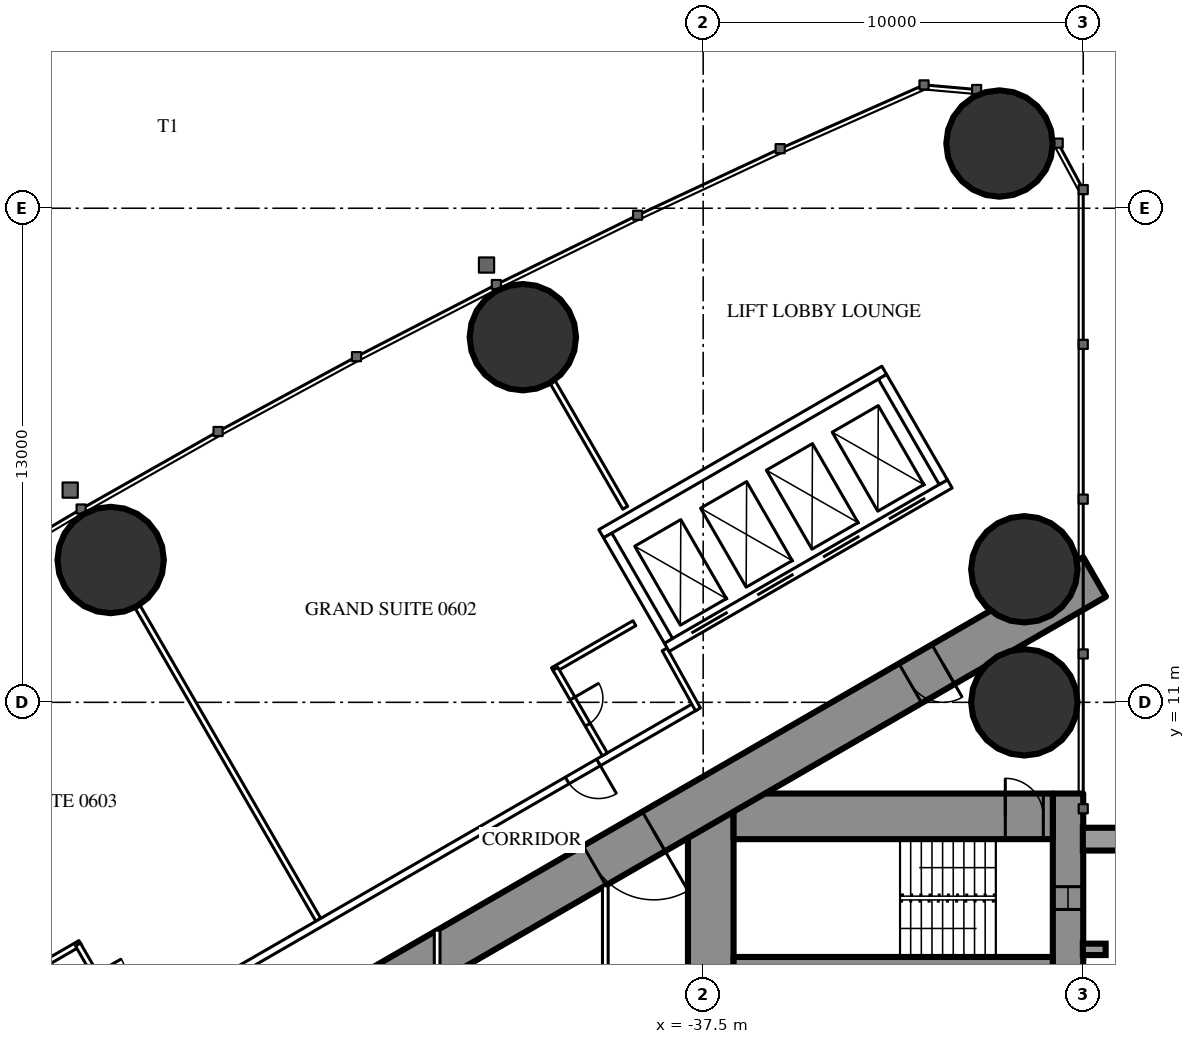
"""IFC4 building model, lengths in metres.
Left out: names, types, materials, properties, quantities, classifications, styles, units other than length and angle.
Written with IfcOpenShell. Run it as: python <this file> out.ifc"""

import sys

from ifc_helpers import new_model, si_unit, direction, frame, frame_2d, origin, origin_2d, place, context, subcontext, project, spatial, rectangle, hollow_circle, extrude, element, fill, save


model = new_model("IFC4")
c1 = context("Model", 3, precision=1e-05, world=origin(), true_north=direction((0.0, 1.0)))
c2 = subcontext(c1, "Body", "Model", "MODEL_VIEW")
j1 = project(units=[si_unit("LENGTHUNIT", "METRE"), si_unit("PLANEANGLEUNIT", "RADIAN")], contexts=[c1])
p1 = place(None, origin())
s1 = spatial("IfcSite", under=j1, at=p1, CompositionType="ELEMENT")
p2 = place(p1, origin())
s2 = spatial("IfcBuilding", under=s1, at=p2, CompositionType="ELEMENT")
p3 = place(p2, frame((0.0, 0.0, 28.5)))
s3 = spatial("IfcBuildingStorey", under=s2, at=p3, CompositionType="ELEMENT", Elevation=28.5)
for number, where, z_axis, x_axis in (
    (1, (-29.703, 25.703, 0.0), (0.0, 0.0, 1.0), (1.0, 0.0, 0.0)),
    (2, (-29.05, 11.0, 0.0), (0.0, 0.0, 1.0), (1.0, 0.0, 0.0)),
    (3, (-29.05, 14.5, 0.0), (0.0, 0.0, 1.0), (1.0, 0.0, 0.0)),
    (4, (-42.245, 20.607, 0.0), (0.0, 0.0, 1.0), (1.0, 0.0, 0.0)),
    (5, (-53.09, 14.745, 0.0), (0.0, 0.0, 1.0), (1.0, 0.0, 0.0)),
):
    element("IfcColumn", number, at=place(p3, frame(where, z_axis=z_axis, x_axis=x_axis)), inside=s3, PredefinedType="COLUMN", context=c2, shape_type="SweptSolid", body=[
        extrude(hollow_circle(Radius=1.4, WallThickness=0.12, at=origin_2d()), origin(), (0.0, 0.0, 1.0), 3.5),
    ])
p4 = place(p3, frame((-27.9, 8.6, 0.0), z_axis=(0.0, 0.0, 1.0), x_axis=(0.0, -1.0, 0.0)))
e6 = element("IfcWall", 6, at=p4, inside=s3, PredefinedType="SHEAR", context=c2, shape_type="SweptSolid", body=[
    extrude(rectangle(XDim=17.2, YDim=0.8, at=frame_2d((8.6, 0.0))), origin(), (0.0, 0.0, 1.0), 3.5),
])
p5 = place(p4, frame((2.45, 0.0, 0.6)))
e7 = element("IfcOpeningElement", 7, at=p5, cuts=e6, PredefinedType="OPENING", context=c2, shape_type="SweptSolid", body=[
    extrude(rectangle(XDim=0.6, YDim=2.1, at=frame_2d((0.3, 1.05))), frame((0.0, 0.41, 0.0), z_axis=(0.0, -1.0, 0.0), x_axis=(1.0, 0.0, 0.0)), (0.0, 0.0, 1.0), 0.82),
])
p6 = place(p4, frame((14.15, 0.0, 0.6)))
e8 = element("IfcOpeningElement", 8, at=p6, cuts=e6, PredefinedType="OPENING", context=c2, shape_type="SweptSolid", body=[
    extrude(rectangle(XDim=0.6, YDim=2.1, at=frame_2d((0.3, 1.05))), frame((0.0, 0.41, 0.0), z_axis=(0.0, -1.0, 0.0), x_axis=(1.0, 0.0, 0.0)), (0.0, 0.0, 1.0), 0.82),
])
p7 = place(p3, frame((-37.3, 8.6, 0.0), z_axis=(0.0, 0.0, 1.0), x_axis=(0.0, -1.0, 0.0)))
e9 = element("IfcWall", 9, at=p7, inside=s3, PredefinedType="SHEAR", context=c2, shape_type="SweptSolid", body=[
    extrude(rectangle(XDim=17.2, YDim=1.2, at=frame_2d((8.6, 0.0))), origin(), (0.0, 0.0, 1.0), 3.5),
])
p8 = place(p7, frame((7.7, 0.0, 0.0)))
e10 = element("IfcOpeningElement", 10, at=p8, cuts=e9, PredefinedType="OPENING", context=c2, shape_type="SweptSolid", body=[
    extrude(rectangle(XDim=1.8, YDim=2.2, at=frame_2d((0.9, 1.1))), frame((0.0, 0.61, 0.0), z_axis=(0.0, -1.0, 0.0), x_axis=(1.0, 0.0, 0.0)), (0.0, 0.0, 1.0), 1.22),
])
p9 = place(p3, frame((-28.3, 8.0, 0.0), z_axis=(0.0, 0.0, 1.0), x_axis=(-1.0, 0.0, 0.0)))
e11 = element("IfcWall", 11, at=p9, inside=s3, PredefinedType="SHEAR", context=c2, shape_type="SweptSolid", body=[
    extrude(rectangle(XDim=8.4, YDim=1.2, at=frame_2d((4.2, 0.0))), origin(), (0.0, 0.0, 1.0), 3.5),
])
p10 = place(p9, frame((0.25, 0.0, 0.0)))
e12 = element("IfcOpeningElement", 12, at=p10, cuts=e11, PredefinedType="OPENING", context=c2, shape_type="SweptSolid", body=[
    extrude(rectangle(XDim=1.0, YDim=2.2, at=frame_2d((0.5, 1.1))), frame((0.0, 0.61, 0.0), z_axis=(0.0, -1.0, 0.0), x_axis=(1.0, 0.0, 0.0)), (0.0, 0.0, 1.0), 1.22),
])
p11 = place(p3, frame((-28.3, 4.15, 0.0), z_axis=(0.0, 0.0, 1.0), x_axis=(-1.0, 0.0, 0.0)))
e13 = element("IfcWall", 13, at=p11, inside=s3, PredefinedType="SHEAR", context=c2, shape_type="SweptSolid", body=[
    extrude(rectangle(XDim=8.4, YDim=0.3, at=frame_2d((4.2, 0.0))), origin(), (0.0, 0.0, 1.0), 3.5),
])
p12 = place(p3, frame((-27.2, 14.3, 0.0), z_axis=(0.0, 0.0, 1.0), x_axis=(-0.866026593062, -0.499997940104, 0.0)))
e14 = element("IfcWall", 14, at=p12, inside=s3, PredefinedType="SHEAR", context=c2, shape_type="SweptSolid", body=[
    extrude(rectangle(XDim=28.946, YDim=1.2, at=frame_2d((14.473, 0.0))), origin(), (0.0, 0.0, 1.0), 3.5),
])
p13 = place(p12, frame((4.6, 0.0, 0.0)))
e15 = element("IfcOpeningElement", 15, at=p13, cuts=e14, PredefinedType="OPENING", context=c2, shape_type="SweptSolid", body=[
    extrude(rectangle(XDim=1.0, YDim=2.2, at=frame_2d((0.5, 1.1))), frame((0.0, 0.61, 0.0), z_axis=(0.0, -1.0, 0.0), x_axis=(1.0, 0.0, 0.0)), (0.0, 0.0, 1.0), 1.22),
])
p14 = place(p12, frame((13.395, 0.0, 0.0)))
e16 = element("IfcOpeningElement", 16, at=p14, cuts=e14, PredefinedType="OPENING", context=c2, shape_type="SweptSolid", body=[
    extrude(rectangle(XDim=1.8, YDim=2.2, at=frame_2d((0.9, 1.1))), frame((0.0, 0.61, 0.0), z_axis=(0.0, -1.0, 0.0), x_axis=(1.0, 0.0, 0.0)), (0.0, 0.0, 1.0), 1.22),
])
p15 = place(p3, frame((-47.627, 5.278, 0.0), z_axis=(0.0, 0.0, 1.0), x_axis=(-0.500009844318, 0.86601972009, 0.0)))
e17 = element("IfcWall", 17, at=p15, inside=s3, PredefinedType="PARTITIONING", context=c2, shape_type="SweptSolid", body=[
    extrude(rectangle(XDim=9.51, YDim=0.15, at=frame_2d((4.755, 0.0))), origin(), (0.0, 0.0, 1.0), 2.25),
])
p16 = place(p3, frame((-39.551, 16.119, 0.0), z_axis=(0.0, 0.0, 1.0), x_axis=(-0.500014214979, 0.866017196607, 0.0)))
e18 = element("IfcWall", 18, at=p16, inside=s3, PredefinedType="PARTITIONING", context=c2, shape_type="SweptSolid", body=[
    extrude(rectangle(XDim=3.815, YDim=0.15, at=frame_2d((1.907, 0.0))), origin(), (0.0, 0.0, 1.0), 3.25),
])
p17 = place(p3, frame((-37.7, 10.894, 0.0), z_axis=(0.0, 0.0, 1.0), x_axis=(-0.866027905338, -0.499995667157, 0.0)))
e19 = element("IfcWall", 19, at=p17, inside=s3, PredefinedType="PARTITIONING", context=c2, shape_type="SweptSolid", body=[
    extrude(rectangle(XDim=21.787, YDim=0.2, at=frame_2d((10.894, 0.0))), origin(), (0.0, 0.0, 1.0), 3.25),
])
p18 = place(p17, frame((16.008, 0.0, 0.0)))
e20 = element("IfcOpeningElement", 20, at=p18, cuts=e19, PredefinedType="OPENING", context=c2, shape_type="SweptSolid", body=[
    extrude(rectangle(XDim=0.95, YDim=2.2, at=frame_2d((0.475, 1.1))), frame((0.0, 0.11, 0.0), z_axis=(0.0, -1.0, 0.0), x_axis=(1.0, 0.0, 0.0)), (0.0, 0.0, 1.0), 0.22),
])
p19 = place(p17, frame((20.058, 0.0, 0.0)))
e21 = element("IfcOpeningElement", 21, at=p19, cuts=e19, PredefinedType="OPENING", context=c2, shape_type="SweptSolid", body=[
    extrude(rectangle(XDim=0.95, YDim=2.2, at=frame_2d((0.475, 1.1))), frame((0.0, 0.11, 0.0), z_axis=(0.0, -1.0, 0.0), x_axis=(1.0, 0.0, 0.0)), (0.0, 0.0, 1.0), 0.22),
])
p20 = place(p17, frame((2.95, 0.0, 0.0)))
e22 = element("IfcOpeningElement", 22, at=p20, cuts=e19, PredefinedType="OPENING", context=c2, shape_type="SweptSolid", body=[
    extrude(rectangle(XDim=0.95, YDim=2.2, at=frame_2d((0.475, 1.1))), frame((0.0, 0.11, 0.0), z_axis=(0.0, -1.0, 0.0), x_axis=(1.0, 0.0, 0.0)), (0.0, 0.0, 1.0), 0.22),
])
p21 = place(p3, frame((-38.513, 12.392, 0.0), z_axis=(0.0, 0.0, 1.0), x_axis=(0.485585508183, -0.874189175317, 0.0)))
e23 = element("IfcWall", 23, at=p21, inside=s3, PredefinedType="PARTITIONING", context=c2, shape_type="SweptSolid", body=[
    extrude(rectangle(XDim=1.805, YDim=0.15, at=frame_2d((0.902, 0.0))), origin(), (0.0, 0.0, 1.0), 3.25),
])
p22 = place(p3, frame((-53.888, 4.665, 0.0), z_axis=(0.0, 0.0, 1.0), x_axis=(-0.866006523861, -0.500032699561, 0.0)))
e24 = element("IfcWall", 24, at=p22, inside=s3, PredefinedType="PARTITIONING", context=c2, shape_type="SweptSolid", body=[
    extrude(rectangle(XDim=2.475, YDim=0.15, at=frame_2d((1.237, 0.0))), origin(), (0.0, 0.0, 1.0), 3.25),
])
p23 = place(p3, frame((-52.653, 2.376, 0.0), z_axis=(0.0, 0.0, 1.0), x_axis=(-0.500006934395, 0.866021400173, 0.0)))
e25 = element("IfcWall", 25, at=p23, inside=s3, PredefinedType="PARTITIONING", context=c2, shape_type="SweptSolid", body=[
    extrude(rectangle(XDim=2.6, YDim=0.15, at=frame_2d((1.3, 0.0))), origin(), (0.0, 0.0, 1.0), 3.25),
])
p24 = place(p23, frame((0.9, 0.0, 0.0)))
e26 = element("IfcOpeningElement", 26, at=p24, cuts=e25, PredefinedType="OPENING", context=c2, shape_type="SweptSolid", body=[
    extrude(rectangle(XDim=0.8, YDim=2.2, at=frame_2d((0.4, 1.1))), frame((0.0, 0.085, 0.0), z_axis=(0.0, -1.0, 0.0), x_axis=(1.0, 0.0, 0.0)), (0.0, 0.0, 1.0), 0.17),
])
p25 = place(p3, frame((-39.31, 13.082, 0.0), z_axis=(0.0, 0.0, 1.0), x_axis=(-0.866031185235, -0.4999899861, 0.0)))
e27 = element("IfcWall", 27, at=p25, inside=s3, PredefinedType="PARTITIONING", context=c2, shape_type="SweptSolid", body=[
    extrude(rectangle(XDim=2.475, YDim=0.15, at=frame_2d((1.238, 0.0))), origin(), (0.0, 0.0, 1.0), 3.25),
])
p26 = place(p3, frame((-40.088, 9.63, 0.0), z_axis=(0.0, 0.0, 1.0), x_axis=(-0.500006934395, 0.866021400173, 0.0)))
e28 = element("IfcWall", 28, at=p26, inside=s3, PredefinedType="PARTITIONING", context=c2, shape_type="SweptSolid", body=[
    extrude(rectangle(XDim=2.6, YDim=0.15, at=frame_2d((1.3, 0.0))), origin(), (0.0, 0.0, 1.0), 3.25),
])
p27 = place(p26, frame((0.9, 0.0, 0.0)))
e29 = element("IfcOpeningElement", 29, at=p27, cuts=e28, PredefinedType="OPENING", context=c2, shape_type="SweptSolid", body=[
    extrude(rectangle(XDim=0.8, YDim=2.2, at=frame_2d((0.4, 1.1))), frame((0.0, 0.085, 0.0), z_axis=(0.0, -1.0, 0.0), x_axis=(1.0, 0.0, 0.0)), (0.0, 0.0, 1.0), 0.17),
])
p28 = place(p3, frame((-40.075, 6.174, 0.0), z_axis=(0.0, 0.0, 1.0), x_axis=(0.0, -1.0, 0.0)))
e30 = element("IfcWall", 30, at=p28, inside=s3, PredefinedType="PARTITIONING", context=c2, shape_type="SweptSolid", body=[
    extrude(rectangle(XDim=7.374, YDim=0.15, at=frame_2d((3.687, 0.0))), origin(), (0.0, 0.0, 1.0), 3.25),
])
p29 = place(p28, frame((2.787, 0.0, 0.0)))
e31 = element("IfcOpeningElement", 31, at=p29, cuts=e30, PredefinedType="OPENING", context=c2, shape_type="SweptSolid", body=[
    extrude(rectangle(XDim=1.8, YDim=2.2, at=frame_2d((0.9, 1.1))), frame((0.0, 0.085, 0.0), z_axis=(0.0, -1.0, 0.0), x_axis=(1.0, 0.0, 0.0)), (0.0, 0.0, 1.0), 0.17),
])
p30 = place(p3, frame((-44.5, 5.005, 0.0), z_axis=(0.0, 0.0, 1.0), x_axis=(0.0, -1.0, 0.0)))
e32 = element("IfcWall", 32, at=p30, inside=s3, PredefinedType="PARTITIONING", context=c2, shape_type="SweptSolid", body=[
    extrude(rectangle(XDim=10.009, YDim=0.15, at=frame_2d((5.005, 0.0))), origin(), (0.0, 0.0, 1.0), 2.45),
])
p31 = place(p30, frame((2.002, 0.0, 0.0)))
e33 = element("IfcOpeningElement", 33, at=p31, cuts=e32, PredefinedType="OPENING", context=c2, shape_type="SweptSolid", body=[
    extrude(rectangle(XDim=1.0, YDim=2.2, at=frame_2d((0.5, 1.1))), frame((0.0, 0.085, 0.0), z_axis=(0.0, -1.0, 0.0), x_axis=(1.0, 0.0, 0.0)), (0.0, 0.0, 1.0), 0.17),
])
p32 = place(p30, frame((7.007, 0.0, 0.0)))
e34 = element("IfcOpeningElement", 34, at=p32, cuts=e32, PredefinedType="OPENING", context=c2, shape_type="SweptSolid", body=[
    extrude(rectangle(XDim=1.0, YDim=2.2, at=frame_2d((0.5, 1.1))), frame((0.0, 0.085, 0.0), z_axis=(0.0, -1.0, 0.0), x_axis=(1.0, 0.0, 0.0)), (0.0, 0.0, 1.0), 0.17),
])
p33 = place(p3, frame((-31.01, 16.747, 0.0), z_axis=(0.0, 0.0, 1.0), x_axis=(-0.866028165386, -0.499995216735, 0.0)))
e35 = element("IfcWall", 35, at=p33, inside=s3, PredefinedType="PARTITIONING", context=c2, shape_type="SweptSolid", body=[
    extrude(rectangle(XDim=8.6, YDim=0.25, at=frame_2d((4.3, 0.0))), origin(), (0.0, 0.0, 1.0), 3.25),
])
p34 = place(p33, frame((0.75, 0.0, 0.0)))
e36 = element("IfcOpeningElement", 36, at=p34, cuts=e35, PredefinedType="OPENING", context=c2, shape_type="SweptSolid", body=[
    extrude(rectangle(XDim=1.1, YDim=2.2, at=frame_2d((0.55, 1.1))), frame((0.0, 0.135, 0.0), z_axis=(0.0, -1.0, 0.0), x_axis=(1.0, 0.0, 0.0)), (0.0, 0.0, 1.0), 0.27),
])
p35 = place(p33, frame((2.75, 0.0, 0.0)))
e37 = element("IfcOpeningElement", 37, at=p35, cuts=e35, PredefinedType="OPENING", context=c2, shape_type="SweptSolid", body=[
    extrude(rectangle(XDim=1.1, YDim=2.2, at=frame_2d((0.55, 1.1))), frame((0.0, 0.135, 0.0), z_axis=(0.0, -1.0, 0.0), x_axis=(1.0, 0.0, 0.0)), (0.0, 0.0, 1.0), 0.27),
])
p36 = place(p33, frame((4.75, 0.0, 0.0)))
e38 = element("IfcOpeningElement", 38, at=p36, cuts=e35, PredefinedType="OPENING", context=c2, shape_type="SweptSolid", body=[
    extrude(rectangle(XDim=1.1, YDim=2.2, at=frame_2d((0.55, 1.1))), frame((0.0, 0.135, 0.0), z_axis=(0.0, -1.0, 0.0), x_axis=(1.0, 0.0, 0.0)), (0.0, 0.0, 1.0), 0.27),
])
p37 = place(p33, frame((6.75, 0.0, 0.0)))
e39 = element("IfcOpeningElement", 39, at=p37, cuts=e35, PredefinedType="OPENING", context=c2, shape_type="SweptSolid", body=[
    extrude(rectangle(XDim=1.1, YDim=2.2, at=frame_2d((0.55, 1.1))), frame((0.0, 0.135, 0.0), z_axis=(0.0, -1.0, 0.0), x_axis=(1.0, 0.0, 0.0)), (0.0, 0.0, 1.0), 0.27),
])
p38 = place(p3, frame((-32.736, 19.736, 0.0), z_axis=(0.0, 0.0, 1.0), x_axis=(-0.866028165386, -0.499995216735, 0.0)))
e40 = element("IfcWall", 40, at=p38, inside=s3, PredefinedType="PARTITIONING", context=c2, shape_type="SweptSolid", body=[
    extrude(rectangle(XDim=8.6, YDim=0.25, at=frame_2d((4.3, 0.0))), origin(), (0.0, 0.0, 1.0), 3.25),
])
p39 = place(p3, frame((-31.181, 16.793, 0.0), z_axis=(0.0, 0.0, 1.0), x_axis=(-0.499929347863, 0.866066190972, 0.0)))
e41 = element("IfcWall", 41, at=p39, inside=s3, PredefinedType="PARTITIONING", context=c2, shape_type="SweptSolid", body=[
    extrude(rectangle(XDim=3.201, YDim=0.25, at=frame_2d((1.6, 0.0))), origin(), (0.0, 0.0, 1.0), 3.25),
])
p40 = place(p3, frame((-38.413, 12.618, 0.0), z_axis=(0.0, 0.0, 1.0), x_axis=(-0.499872130319, 0.866099216793, 0.0)))
e42 = element("IfcWall", 42, at=p40, inside=s3, PredefinedType="PARTITIONING", context=c2, shape_type="SweptSolid", body=[
    extrude(rectangle(XDim=3.2, YDim=0.25, at=frame_2d((1.6, 0.0))), origin(), (0.0, 0.0, 1.0), 3.25),
])
p41 = place(p27, origin())
e43 = element("IfcDoor", 43, at=p41, inside=s3, OperationType="SINGLE_SWING_RIGHT", PredefinedType="DOOR", context=c2, shape_type="SweptSolid", body=[
    extrude(rectangle(XDim=0.8, YDim=2.2, at=frame_2d((0.4, 1.1))), frame((0.0, 0.025, 0.0), z_axis=(0.0, -1.0, 0.0), x_axis=(1.0, 0.0, 0.0)), (0.0, 0.0, 1.0), 0.05),
])
fill(e29, e43)
p42 = place(p20, origin())
e44 = element("IfcDoor", 44, at=p42, inside=s3, OperationType="SINGLE_SWING_LEFT", PredefinedType="DOOR", context=c2, shape_type="SweptSolid", body=[
    extrude(rectangle(XDim=0.95, YDim=2.2, at=frame_2d((0.475, 1.1))), frame((0.0, 0.025, 0.0), z_axis=(0.0, -1.0, 0.0), x_axis=(1.0, 0.0, 0.0)), (0.0, 0.0, 1.0), 0.05),
])
fill(e22, e44)
p43 = place(p13, origin())
e45 = element("IfcDoor", 45, at=p43, inside=s3, OperationType="SINGLE_SWING_LEFT", PredefinedType="DOOR", context=c2, shape_type="SweptSolid", body=[
    extrude(rectangle(XDim=1.0, YDim=2.2, at=frame_2d((0.5, 1.1))), frame((0.0, 0.025, 0.0), z_axis=(0.0, -1.0, 0.0), x_axis=(1.0, 0.0, 0.0)), (0.0, 0.0, 1.0), 0.05),
])
fill(e15, e45)
p44 = place(p14, origin())
e46 = element("IfcDoor", 46, at=p44, inside=s3, OperationType="DOUBLE_DOOR_SINGLE_SWING", PredefinedType="DOOR", context=c2, shape_type="SweptSolid", body=[
    extrude(rectangle(XDim=1.8, YDim=2.2, at=frame_2d((0.9, 1.1))), frame((0.0, 0.025, 0.0), z_axis=(0.0, -1.0, 0.0), x_axis=(1.0, 0.0, 0.0)), (0.0, 0.0, 1.0), 0.05),
])
fill(e16, e46)
p45 = place(p10, origin())
e47 = element("IfcDoor", 47, at=p45, inside=s3, OperationType="SINGLE_SWING_RIGHT", PredefinedType="DOOR", context=c2, shape_type="SweptSolid", body=[
    extrude(rectangle(XDim=1.0, YDim=2.2, at=frame_2d((0.5, 1.1))), frame((0.0, 0.025, 0.0), z_axis=(0.0, -1.0, 0.0), x_axis=(1.0, 0.0, 0.0)), (0.0, 0.0, 1.0), 0.05),
])
fill(e12, e47)
p46 = place(p34, origin())
e48 = element("IfcDoor", 48, at=p46, inside=s3, OperationType="DOUBLE_DOOR_SLIDING", PredefinedType="USERDEFINED", context=c2, shape_type="SweptSolid", body=[
    extrude(rectangle(XDim=1.1, YDim=2.2, at=frame_2d((0.55, 1.1))), frame((0.0, 0.025, 0.0), z_axis=(0.0, -1.0, 0.0), x_axis=(1.0, 0.0, 0.0)), (0.0, 0.0, 1.0), 0.05),
])
fill(e36, e48)
p47 = place(p35, origin())
e49 = element("IfcDoor", 49, at=p47, inside=s3, OperationType="DOUBLE_DOOR_SLIDING", PredefinedType="USERDEFINED", context=c2, shape_type="SweptSolid", body=[
    extrude(rectangle(XDim=1.1, YDim=2.2, at=frame_2d((0.55, 1.1))), frame((0.0, 0.025, 0.0), z_axis=(0.0, -1.0, 0.0), x_axis=(1.0, 0.0, 0.0)), (0.0, 0.0, 1.0), 0.05),
])
fill(e37, e49)
p48 = place(p36, origin())
e50 = element("IfcDoor", 50, at=p48, inside=s3, OperationType="DOUBLE_DOOR_SLIDING", PredefinedType="USERDEFINED", context=c2, shape_type="SweptSolid", body=[
    extrude(rectangle(XDim=1.1, YDim=2.2, at=frame_2d((0.55, 1.1))), frame((0.0, 0.025, 0.0), z_axis=(0.0, -1.0, 0.0), x_axis=(1.0, 0.0, 0.0)), (0.0, 0.0, 1.0), 0.05),
])
fill(e38, e50)
p49 = place(p37, origin())
e51 = element("IfcDoor", 51, at=p49, inside=s3, OperationType="DOUBLE_DOOR_SLIDING", PredefinedType="USERDEFINED", context=c2, shape_type="SweptSolid", body=[
    extrude(rectangle(XDim=1.1, YDim=2.2, at=frame_2d((0.55, 1.1))), frame((0.0, 0.025, 0.0), z_axis=(0.0, -1.0, 0.0), x_axis=(1.0, 0.0, 0.0)), (0.0, 0.0, 1.0), 0.05),
])
fill(e39, e51)
p50 = place(p5, origin())
e52 = element("IfcWindow", 52, at=p50, inside=s3, PartitioningType="SINGLE_PANEL", PredefinedType="WINDOW", context=c2, shape_type="SweptSolid", body=[
    extrude(rectangle(XDim=0.6, YDim=2.1, at=frame_2d((0.3, 1.05))), frame((0.0, 0.03, 0.0), z_axis=(0.0, -1.0, 0.0), x_axis=(1.0, 0.0, 0.0)), (0.0, 0.0, 1.0), 0.06),
])
fill(e7, e52)
save(model, sys.argv[1])
